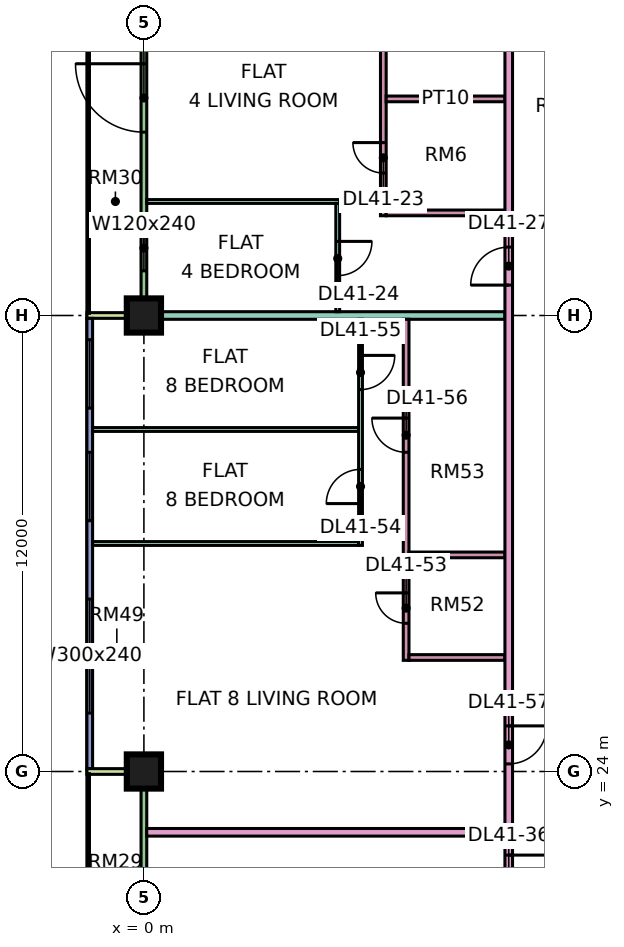
"""IFC4 building model, lengths in metres.
Left out: names, types, materials, properties, quantities, classifications, styles, units other than length and angle.
Written with IfcOpenShell. Run it as: python <this file> out.ifc"""

import sys

from ifc_helpers import new_model, si_unit, direction, frame, frame_2d, origin, origin_2d, place, context, subcontext, project, spatial, rectangle, extrude, element, fill, save


model = new_model("IFC4")
c1 = context("Model", 3, precision=1e-05, world=origin(), true_north=direction((0.0, 1.0)))
c2 = subcontext(c1, "Body", "Model", "MODEL_VIEW")
j1 = project(units=[si_unit("LENGTHUNIT", "METRE"), si_unit("PLANEANGLEUNIT", "RADIAN")], contexts=[c1])
p1 = place(None, origin())
s1 = spatial("IfcSite", under=j1, at=p1, CompositionType="ELEMENT")
p2 = place(p1, origin())
s2 = spatial("IfcBuilding", under=s1, at=p2, CompositionType="ELEMENT")
p3 = place(p2, frame((0.0, 0.0, 179.9)))
s3 = spatial("IfcBuildingStorey", under=s2, at=p3, CompositionType="ELEMENT", Elevation=179.9)
p4 = place(p3, frame((0.0, 24.0, 0.0), z_axis=(0.0, 0.0, 1.0), x_axis=(1.0, 0.0, 0.0)))
e1 = element("IfcColumn", 1, at=p4, inside=s3, PredefinedType="COLUMN", context=c2, shape_type="SweptSolid", body=[
    extrude(rectangle(XDim=0.9, YDim=0.9, at=origin_2d()), origin(), (0.0, 0.0, 1.0), 3.75),
])
p5 = place(p3, frame((0.0, 36.0, 0.0), z_axis=(0.0, 0.0, 1.0), x_axis=(1.0, 0.0, 0.0)))
e2 = element("IfcColumn", 2, at=p5, inside=s3, PredefinedType="COLUMN", context=c2, shape_type="SweptSolid", body=[
    extrude(rectangle(XDim=0.9, YDim=0.9, at=origin_2d()), origin(), (0.0, 0.0, 1.0), 3.75),
])
p6 = place(p3, frame((0.0, 47.925, 0.0), z_axis=(0.0, 0.0, 1.0), x_axis=(0.0, -1.0, 0.0)))
e3 = element("IfcWall", 3, at=p6, inside=s3, PredefinedType="SOLIDWALL", context=c2, shape_type="SweptSolid", body=[
    extrude(rectangle(XDim=11.85, YDim=0.15, at=frame_2d((5.925, 0.0))), origin(), (0.0, 0.0, 1.0), 3.35),
])
p7 = place(p6, frame((0.587, 0.0, 0.45)))
e4 = element("IfcOpeningElement", 4, at=p7, cuts=e3, PredefinedType="OPENING", context=c2, shape_type="SweptSolid", body=[
    extrude(rectangle(XDim=1.2, YDim=2.4, at=frame_2d((0.6, 1.2))), frame((0.0, 0.085, 0.0), z_axis=(0.0, -1.0, 0.0), x_axis=(1.0, 0.0, 0.0)), (0.0, 0.0, 1.0), 0.17),
])
p8 = place(p6, frame((5.3, 0.0, 0.0)))
e5 = element("IfcOpeningElement", 5, at=p8, cuts=e3, PredefinedType="OPENING", context=c2, shape_type="SweptSolid", body=[
    extrude(rectangle(XDim=1.8, YDim=2.4, at=frame_2d((0.9, 1.2))), frame((0.0, 0.085, 0.0), z_axis=(0.0, -1.0, 0.0), x_axis=(1.0, 0.0, 0.0)), (0.0, 0.0, 1.0), 0.17),
])
p9 = place(p6, frame((9.55, 0.0, 0.45)))
e6 = element("IfcOpeningElement", 6, at=p9, cuts=e3, PredefinedType="OPENING", context=c2, shape_type="SweptSolid", body=[
    extrude(rectangle(XDim=1.2, YDim=2.4, at=frame_2d((0.6, 1.2))), frame((0.0, 0.085, 0.0), z_axis=(0.0, -1.0, 0.0), x_axis=(1.0, 0.0, 0.0)), (0.0, 0.0, 1.0), 0.17),
])
p10 = place(p3, frame((-1.5, 36.0, 0.0), z_axis=(0.0, 0.0, 1.0), x_axis=(1.0, 0.0, 0.0)))
e7 = element("IfcWall", 7, at=p10, inside=s3, PredefinedType="SOLIDWALL", context=c2, shape_type="SweptSolid", body=[
    extrude(rectangle(XDim=1.5, YDim=0.15, at=frame_2d((0.75, 0.0))), origin(), (0.0, 0.0, 1.0), 3.35),
])
p11 = place(p3, frame((-1.425, 35.925, 0.0), z_axis=(0.0, 0.0, 1.0), x_axis=(0.0, -1.0, 0.0)))
e8 = element("IfcWall", 8, at=p11, inside=s3, PredefinedType="SOLIDWALL", context=c2, shape_type="SweptSolid", body=[
    extrude(rectangle(XDim=11.85, YDim=0.15, at=frame_2d((5.925, 0.0))), origin(), (0.0, 0.0, 1.0), 3.35),
])
p12 = place(p11, frame((0.562, 0.0, 0.45)))
e9 = element("IfcOpeningElement", 9, at=p12, cuts=e8, PredefinedType="OPENING", context=c2, shape_type="SweptSolid", body=[
    extrude(rectangle(XDim=1.8, YDim=2.4, at=frame_2d((0.9, 1.2))), frame((0.0, 0.085, 0.0), z_axis=(0.0, -1.0, 0.0), x_axis=(1.0, 0.0, 0.0)), (0.0, 0.0, 1.0), 0.17),
])
p13 = place(p11, frame((3.525, 0.0, 0.45)))
e10 = element("IfcOpeningElement", 10, at=p13, cuts=e8, PredefinedType="OPENING", context=c2, shape_type="SweptSolid", body=[
    extrude(rectangle(XDim=1.8, YDim=2.4, at=frame_2d((0.9, 1.2))), frame((0.0, 0.085, 0.0), z_axis=(0.0, -1.0, 0.0), x_axis=(1.0, 0.0, 0.0)), (0.0, 0.0, 1.0), 0.17),
])
p14 = place(p11, frame((7.387, 0.0, 0.45)))
e11 = element("IfcOpeningElement", 11, at=p14, cuts=e8, PredefinedType="OPENING", context=c2, shape_type="SweptSolid", body=[
    extrude(rectangle(XDim=3.0, YDim=2.4, at=frame_2d((1.5, 1.2))), frame((0.0, 0.085, 0.0), z_axis=(0.0, -1.0, 0.0), x_axis=(1.0, 0.0, 0.0)), (0.0, 0.0, 1.0), 0.17),
])
p15 = place(p3, frame((0.0, 23.925, 0.0), z_axis=(0.0, 0.0, 1.0), x_axis=(0.0, -1.0, 0.0)))
e12 = element("IfcWall", 12, at=p15, inside=s3, PredefinedType="SOLIDWALL", context=c2, shape_type="SweptSolid", body=[
    extrude(rectangle(XDim=11.35, YDim=0.15, at=frame_2d((5.675, 0.0))), origin(), (0.0, 0.0, 1.0), 3.35),
])
p16 = place(p15, frame((6.738, 0.0, 0.0)))
e13 = element("IfcOpeningElement", 13, at=p16, cuts=e12, PredefinedType="OPENING", context=c2, shape_type="SweptSolid", body=[
    extrude(rectangle(XDim=1.8, YDim=2.4, at=frame_2d((0.9, 1.2))), frame((0.0, 0.085, 0.0), z_axis=(0.0, -1.0, 0.0), x_axis=(1.0, 0.0, 0.0)), (0.0, 0.0, 1.0), 0.17),
])
p17 = place(p3, frame((-1.5, 24.0, 0.0), z_axis=(0.0, 0.0, 1.0), x_axis=(1.0, 0.0, 0.0)))
e14 = element("IfcWall", 14, at=p17, inside=s3, PredefinedType="SOLIDWALL", context=c2, shape_type="SweptSolid", body=[
    extrude(rectangle(XDim=1.5, YDim=0.15, at=frame_2d((0.75, 0.0))), origin(), (0.0, 0.0, 1.0), 3.35),
])
p18 = place(p3, frame((-1.351, 33.0, 0.0), z_axis=(0.0, 0.0, 1.0), x_axis=(1.0, 0.0, 0.0)))
e15 = element("IfcWall", 15, at=p18, inside=s3, PredefinedType="PARTITIONING", context=c2, shape_type="SweptSolid", body=[
    extrude(rectangle(XDim=7.001, YDim=0.1, at=frame_2d((3.5, 0.0))), origin(), (0.0, 0.0, 1.0), 3.35),
])
p19 = place(p3, frame((-1.35, 30.0, 0.0), z_axis=(0.0, 0.0, 1.0), x_axis=(1.0, 0.0, 0.0)))
e16 = element("IfcWall", 16, at=p19, inside=s3, PredefinedType="PARTITIONING", context=c2, shape_type="SweptSolid", body=[
    extrude(rectangle(XDim=7.0, YDim=0.1, at=frame_2d((3.5, 0.0))), origin(), (0.0, 0.0, 1.0), 3.35),
])
e17 = element("IfcWall", 17, at=p5, inside=s3, PredefinedType="PARTITIONING", context=c2, shape_type="SweptSolid", body=[
    extrude(rectangle(XDim=9.5, YDim=0.2, at=frame_2d((4.75, 0.0))), origin(), (0.0, 0.0, 1.0), 3.35),
])
p20 = place(p3, frame((0.074, 22.4, 0.0), z_axis=(0.0, 0.0, 1.0), x_axis=(1.0, 0.0, 0.0)))
e18 = element("IfcWall", 18, at=p20, inside=s3, PredefinedType="PARTITIONING", context=c2, shape_type="SweptSolid", body=[
    extrude(rectangle(XDim=9.426, YDim=0.2, at=frame_2d((4.713, 0.0))), origin(), (0.0, 0.0, 1.0), 3.35),
])
p21 = place(p3, frame((0.074, 39.0, 0.0), z_axis=(0.0, 0.0, 1.0), x_axis=(1.0, 0.0, 0.0)))
e19 = element("IfcWall", 19, at=p21, inside=s3, PredefinedType="PARTITIONING", context=c2, shape_type="SweptSolid", body=[
    extrude(rectangle(XDim=5.076, YDim=0.1, at=frame_2d((2.538, 0.0))), origin(), (0.0, 0.0, 1.0), 3.35),
])
p22 = place(p3, frame((5.1, 36.1, 0.0), z_axis=(0.0, 0.0, 1.0), x_axis=(0.0, 1.0, 0.0)))
e20 = element("IfcWall", 20, at=p22, inside=s3, PredefinedType="PARTITIONING", context=c2, shape_type="SweptSolid", body=[
    extrude(rectangle(XDim=2.85, YDim=0.1, at=frame_2d((1.425, 0.0))), origin(), (0.0, 0.0, 1.0), 3.35),
])
p23 = place(p22, frame((0.95, 0.0, 0.0)))
e21 = element("IfcOpeningElement", 21, at=p23, cuts=e20, PredefinedType="OPENING", context=c2, shape_type="SweptSolid", body=[
    extrude(rectangle(XDim=0.9, YDim=2.1, at=frame_2d((0.45, 1.05))), frame((0.0, 0.06, 0.0), z_axis=(0.0, -1.0, 0.0), x_axis=(1.0, 0.0, 0.0)), (0.0, 0.0, 1.0), 0.12),
])
p24 = place(p3, frame((5.7, 29.95, 0.0), z_axis=(0.0, 0.0, 1.0), x_axis=(0.0, 1.0, 0.0)))
e22 = element("IfcWall", 22, at=p24, inside=s3, PredefinedType="PARTITIONING", context=c2, shape_type="SweptSolid", body=[
    extrude(rectangle(XDim=5.95, YDim=0.1, at=frame_2d((2.975, 0.0))), origin(), (0.0, 0.0, 1.0), 3.35),
])
p25 = place(p24, frame((1.1, 0.0, 0.0)))
e23 = element("IfcOpeningElement", 23, at=p25, cuts=e22, PredefinedType="OPENING", context=c2, shape_type="SweptSolid", body=[
    extrude(rectangle(XDim=0.9, YDim=2.1, at=frame_2d((0.45, 1.05))), frame((0.0, 0.06, 0.0), z_axis=(0.0, -1.0, 0.0), x_axis=(1.0, 0.0, 0.0)), (0.0, 0.0, 1.0), 0.12),
])
p26 = place(p24, frame((4.1, 0.0, 0.0)))
e24 = element("IfcOpeningElement", 24, at=p26, cuts=e22, PredefinedType="OPENING", context=c2, shape_type="SweptSolid", body=[
    extrude(rectangle(XDim=0.9, YDim=2.1, at=frame_2d((0.45, 1.05))), frame((0.0, 0.06, 0.0), z_axis=(0.0, -1.0, 0.0), x_axis=(1.0, 0.0, 0.0)), (0.0, 0.0, 1.0), 0.12),
])
p27 = place(p3, frame((6.3, 38.625, 0.0), z_axis=(0.0, 0.0, 1.0), x_axis=(0.0, 1.0, 0.0)))
e25 = element("IfcWall", 25, at=p27, inside=s3, PredefinedType="PARTITIONING", context=c2, shape_type="SweptSolid", body=[
    extrude(rectangle(XDim=9.275, YDim=0.15, at=frame_2d((4.637, 0.0))), origin(), (0.0, 0.0, 1.0), 3.35),
])
p28 = place(p27, frame((1.125, 0.0, 0.0)))
e26 = element("IfcOpeningElement", 26, at=p28, cuts=e25, PredefinedType="OPENING", context=c2, shape_type="SweptSolid", body=[
    extrude(rectangle(XDim=0.8, YDim=2.1, at=frame_2d((0.4, 1.05))), frame((0.0, 0.085, 0.0), z_axis=(0.0, -1.0, 0.0), x_axis=(1.0, 0.0, 0.0)), (0.0, 0.0, 1.0), 0.17),
])
p29 = place(p27, frame((5.775, 0.0, 0.0)))
e27 = element("IfcOpeningElement", 27, at=p29, cuts=e25, PredefinedType="OPENING", context=c2, shape_type="SweptSolid", body=[
    extrude(rectangle(XDim=0.9, YDim=2.1, at=frame_2d((0.45, 1.05))), frame((0.0, 0.085, 0.0), z_axis=(0.0, -1.0, 0.0), x_axis=(1.0, 0.0, 0.0)), (0.0, 0.0, 1.0), 0.17),
])
for number, where, z_axis, x_axis in (
    (28, (6.375, 38.7, 0.0), (0.0, 0.0, 1.0), (1.0, 0.0, 0.0)),
    (29, (6.375, 41.7, 0.0), (0.0, 0.0, 1.0), (1.0, 0.0, 0.0)),
):
    element("IfcWall", number, at=place(p3, frame(where, z_axis=z_axis, x_axis=x_axis)), inside=s3, PredefinedType="PARTITIONING", context=c2, shape_type="SweptSolid", body=[
        extrude(rectangle(XDim=3.125, YDim=0.15, at=frame_2d((1.562, 0.0))), origin(), (0.0, 0.0, 1.0), 3.35),
    ])
p30 = place(p3, frame((6.9, 26.925, 0.0), z_axis=(0.0, 0.0, 1.0), x_axis=(0.0, 1.0, 0.0)))
e30 = element("IfcWall", 30, at=p30, inside=s3, PredefinedType="PARTITIONING", context=c2, shape_type="SweptSolid", body=[
    extrude(rectangle(XDim=8.975, YDim=0.15, at=frame_2d((4.487, 0.0))), origin(), (0.0, 0.0, 1.0), 3.35),
])
p31 = place(p30, frame((0.975, 0.0, 0.0)))
e31 = element("IfcOpeningElement", 31, at=p31, cuts=e30, PredefinedType="OPENING", context=c2, shape_type="SweptSolid", body=[
    extrude(rectangle(XDim=0.8, YDim=2.1, at=frame_2d((0.4, 1.05))), frame((0.0, 0.085, 0.0), z_axis=(0.0, -1.0, 0.0), x_axis=(1.0, 0.0, 0.0)), (0.0, 0.0, 1.0), 0.17),
])
p32 = place(p30, frame((5.475, 0.0, 0.0)))
e32 = element("IfcOpeningElement", 32, at=p32, cuts=e30, PredefinedType="OPENING", context=c2, shape_type="SweptSolid", body=[
    extrude(rectangle(XDim=0.9, YDim=2.1, at=frame_2d((0.45, 1.05))), frame((0.0, 0.085, 0.0), z_axis=(0.0, -1.0, 0.0), x_axis=(1.0, 0.0, 0.0)), (0.0, 0.0, 1.0), 0.17),
])
for number, where, z_axis, x_axis in (
    (33, (6.975, 27.0, 0.0), (0.0, 0.0, 1.0), (1.0, 0.0, 0.0)),
    (34, (6.975, 29.7, 0.0), (0.0, 0.0, 1.0), (1.0, 0.0, 0.0)),
):
    element("IfcWall", number, at=place(p3, frame(where, z_axis=z_axis, x_axis=x_axis)), inside=s3, PredefinedType="PARTITIONING", context=c2, shape_type="SweptSolid", body=[
        extrude(rectangle(XDim=2.525, YDim=0.15, at=frame_2d((1.262, 0.0))), origin(), (0.0, 0.0, 1.0), 3.35),
    ])
p33 = place(p3, frame((9.6, 20.0, 0.0), z_axis=(0.0, 0.0, 1.0), x_axis=(0.0, 1.0, 0.0)))
e35 = element("IfcWall", 35, at=p33, inside=s3, PredefinedType="PARTITIONING", context=c2, shape_type="SweptSolid", body=[
    extrude(rectangle(XDim=44.35, YDim=0.2, at=frame_2d((22.175, 0.0))), origin(), (0.0, 0.0, 1.0), 3.35),
])
p34 = place(p33, frame((16.8, 0.0, 0.0)))
e36 = element("IfcOpeningElement", 36, at=p34, cuts=e35, PredefinedType="OPENING", context=c2, shape_type="SweptSolid", body=[
    extrude(rectangle(XDim=1.0, YDim=2.1, at=frame_2d((0.5, 1.05))), frame((0.0, 0.11, 0.0), z_axis=(0.0, -1.0, 0.0), x_axis=(1.0, 0.0, 0.0)), (0.0, 0.0, 1.0), 0.22),
])
p35 = place(p33, frame((40.65, 0.0, 0.0)))
e37 = element("IfcOpeningElement", 37, at=p35, cuts=e35, PredefinedType="OPENING", context=c2, shape_type="SweptSolid", body=[
    extrude(rectangle(XDim=1.0, YDim=2.1, at=frame_2d((0.5, 1.05))), frame((0.0, 0.11, 0.0), z_axis=(0.0, -1.0, 0.0), x_axis=(1.0, 0.0, 0.0)), (0.0, 0.0, 1.0), 0.22),
])
p36 = place(p33, frame((0.6, 0.0, 0.0)))
e38 = element("IfcOpeningElement", 38, at=p36, cuts=e35, PredefinedType="OPENING", context=c2, shape_type="SweptSolid", body=[
    extrude(rectangle(XDim=1.2, YDim=2.1, at=frame_2d((0.6, 1.05))), frame((0.0, 0.11, 0.0), z_axis=(0.0, -1.0, 0.0), x_axis=(1.0, 0.0, 0.0)), (0.0, 0.0, 1.0), 0.22),
])
p37 = place(p33, frame((4.2, 0.0, 0.0)))
e39 = element("IfcOpeningElement", 39, at=p37, cuts=e35, PredefinedType="OPENING", context=c2, shape_type="SweptSolid", body=[
    extrude(rectangle(XDim=1.0, YDim=2.1, at=frame_2d((0.5, 1.05))), frame((0.0, 0.11, 0.0), z_axis=(0.0, -1.0, 0.0), x_axis=(1.0, 0.0, 0.0)), (0.0, 0.0, 1.0), 0.22),
])
p38 = place(p8, frame((1.8, 0.0, 0.0), z_axis=(0.0, 0.0, 1.0), x_axis=(-1.0, 0.0, 0.0)))
e40 = element("IfcDoor", 40, at=p38, inside=s3, OperationType="DOUBLE_DOOR_SINGLE_SWING", PredefinedType="DOOR", context=c2, shape_type="SweptSolid", body=[
    extrude(rectangle(XDim=1.8, YDim=2.4, at=frame_2d((0.9, 1.2))), frame((0.0, 0.025, 0.0), z_axis=(0.0, -1.0, 0.0), x_axis=(1.0, 0.0, 0.0)), (0.0, 0.0, 1.0), 0.05),
])
fill(e5, e40)
p39 = place(p9, origin())
e41 = element("IfcWindow", 41, at=p39, inside=s3, PartitioningType="SINGLE_PANEL", PredefinedType="WINDOW", context=c2, shape_type="SweptSolid", body=[
    extrude(rectangle(XDim=1.2, YDim=2.4, at=frame_2d((0.6, 1.2))), frame((0.0, 0.03, 0.0), z_axis=(0.0, -1.0, 0.0), x_axis=(1.0, 0.0, 0.0)), (0.0, 0.0, 1.0), 0.06),
])
fill(e6, e41)
p40 = place(p12, origin())
e42 = element("IfcWindow", 42, at=p40, inside=s3, PartitioningType="SINGLE_PANEL", PredefinedType="WINDOW", context=c2, shape_type="SweptSolid", body=[
    extrude(rectangle(XDim=1.8, YDim=2.4, at=frame_2d((0.9, 1.2))), frame((0.0, 0.03, 0.0), z_axis=(0.0, -1.0, 0.0), x_axis=(1.0, 0.0, 0.0)), (0.0, 0.0, 1.0), 0.06),
])
fill(e9, e42)
p41 = place(p13, origin())
e43 = element("IfcWindow", 43, at=p41, inside=s3, PartitioningType="SINGLE_PANEL", PredefinedType="WINDOW", context=c2, shape_type="SweptSolid", body=[
    extrude(rectangle(XDim=1.8, YDim=2.4, at=frame_2d((0.9, 1.2))), frame((0.0, 0.03, 0.0), z_axis=(0.0, -1.0, 0.0), x_axis=(1.0, 0.0, 0.0)), (0.0, 0.0, 1.0), 0.06),
])
fill(e10, e43)
p42 = place(p14, origin())
e44 = element("IfcWindow", 44, at=p42, inside=s3, PartitioningType="SINGLE_PANEL", PredefinedType="WINDOW", context=c2, shape_type="SweptSolid", body=[
    extrude(rectangle(XDim=3.0, YDim=2.4, at=frame_2d((1.5, 1.2))), frame((0.0, 0.03, 0.0), z_axis=(0.0, -1.0, 0.0), x_axis=(1.0, 0.0, 0.0)), (0.0, 0.0, 1.0), 0.06),
])
fill(e11, e44)
p43 = place(p28, frame((0.8, 0.0, 0.0), z_axis=(0.0, 0.0, 1.0), x_axis=(-1.0, 0.0, 0.0)))
e45 = element("IfcDoor", 45, at=p43, inside=s3, OperationType="SINGLE_SWING_RIGHT", PredefinedType="DOOR", context=c2, shape_type="SweptSolid", body=[
    extrude(rectangle(XDim=0.8, YDim=2.1, at=frame_2d((0.4, 1.05))), frame((0.0, 0.025, 0.0), z_axis=(0.0, -1.0, 0.0), x_axis=(1.0, 0.0, 0.0)), (0.0, 0.0, 1.0), 0.05),
])
fill(e26, e45)
p44 = place(p23, origin())
e46 = element("IfcDoor", 46, at=p44, inside=s3, OperationType="SINGLE_SWING_RIGHT", PredefinedType="DOOR", context=c2, shape_type="SweptSolid", body=[
    extrude(rectangle(XDim=0.9, YDim=2.1, at=frame_2d((0.45, 1.05))), frame((0.0, 0.025, 0.0), z_axis=(0.0, -1.0, 0.0), x_axis=(1.0, 0.0, 0.0)), (0.0, 0.0, 1.0), 0.05),
])
fill(e21, e46)
p45 = place(p34, origin())
e47 = element("IfcDoor", 47, at=p45, inside=s3, OperationType="SINGLE_SWING_LEFT", PredefinedType="DOOR", context=c2, shape_type="SweptSolid", body=[
    extrude(rectangle(XDim=1.0, YDim=2.1, at=frame_2d((0.5, 1.05))), frame((0.0, 0.025, 0.0), z_axis=(0.0, -1.0, 0.0), x_axis=(1.0, 0.0, 0.0)), (0.0, 0.0, 1.0), 0.05),
])
fill(e36, e47)
p46 = place(p36, origin())
e48 = element("IfcDoor", 48, at=p46, inside=s3, OperationType="SINGLE_SWING_RIGHT", PredefinedType="DOOR", context=c2, shape_type="SweptSolid", body=[
    extrude(rectangle(XDim=1.2, YDim=2.1, at=frame_2d((0.6, 1.05))), frame((0.0, 0.025, 0.0), z_axis=(0.0, -1.0, 0.0), x_axis=(1.0, 0.0, 0.0)), (0.0, 0.0, 1.0), 0.05),
])
fill(e38, e48)
p47 = place(p31, frame((0.8, 0.0, 0.0), z_axis=(0.0, 0.0, 1.0), x_axis=(-1.0, 0.0, 0.0)))
e49 = element("IfcDoor", 49, at=p47, inside=s3, OperationType="SINGLE_SWING_RIGHT", PredefinedType="DOOR", context=c2, shape_type="SweptSolid", body=[
    extrude(rectangle(XDim=0.8, YDim=2.1, at=frame_2d((0.4, 1.05))), frame((0.0, 0.025, 0.0), z_axis=(0.0, -1.0, 0.0), x_axis=(1.0, 0.0, 0.0)), (0.0, 0.0, 1.0), 0.05),
])
fill(e31, e49)
p48 = place(p25, origin())
e50 = element("IfcDoor", 50, at=p48, inside=s3, OperationType="SINGLE_SWING_LEFT", PredefinedType="DOOR", context=c2, shape_type="SweptSolid", body=[
    extrude(rectangle(XDim=0.9, YDim=2.1, at=frame_2d((0.45, 1.05))), frame((0.0, 0.025, 0.0), z_axis=(0.0, -1.0, 0.0), x_axis=(1.0, 0.0, 0.0)), (0.0, 0.0, 1.0), 0.05),
])
fill(e23, e50)
p49 = place(p26, origin())
e51 = element("IfcDoor", 51, at=p49, inside=s3, OperationType="SINGLE_SWING_RIGHT", PredefinedType="DOOR", context=c2, shape_type="SweptSolid", body=[
    extrude(rectangle(XDim=0.9, YDim=2.1, at=frame_2d((0.45, 1.05))), frame((0.0, 0.025, 0.0), z_axis=(0.0, -1.0, 0.0), x_axis=(1.0, 0.0, 0.0)), (0.0, 0.0, 1.0), 0.05),
])
fill(e24, e51)
p50 = place(p32, frame((0.9, 0.0, 0.0), z_axis=(0.0, 0.0, 1.0), x_axis=(-1.0, 0.0, 0.0)))
e52 = element("IfcDoor", 52, at=p50, inside=s3, OperationType="SINGLE_SWING_RIGHT", PredefinedType="DOOR", context=c2, shape_type="SweptSolid", body=[
    extrude(rectangle(XDim=0.9, YDim=2.1, at=frame_2d((0.45, 1.05))), frame((0.0, 0.025, 0.0), z_axis=(0.0, -1.0, 0.0), x_axis=(1.0, 0.0, 0.0)), (0.0, 0.0, 1.0), 0.05),
])
fill(e32, e52)
p51 = place(p37, origin())
e53 = element("IfcDoor", 53, at=p51, inside=s3, OperationType="SINGLE_SWING_RIGHT", PredefinedType="DOOR", context=c2, shape_type="SweptSolid", body=[
    extrude(rectangle(XDim=1.0, YDim=2.1, at=frame_2d((0.5, 1.05))), frame((0.0, 0.025, 0.0), z_axis=(0.0, -1.0, 0.0), x_axis=(1.0, 0.0, 0.0)), (0.0, 0.0, 1.0), 0.05),
])
fill(e39, e53)
save(model, sys.argv[1])
